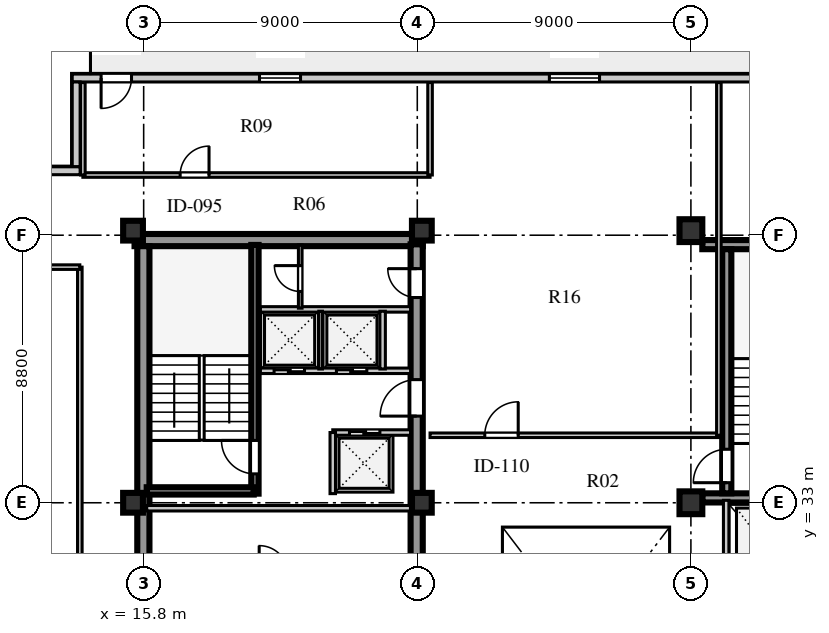
"""IFC4 building model, lengths in metres.
Left out: names, types, materials, properties, quantities, classifications, styles, units other than length and angle.
Written with IfcOpenShell. Run it as: python <this file> out.ifc"""

import sys

from ifc_helpers import new_model, si_unit, direction, frame, frame_2d, origin, origin_2d, place, context, subcontext, project, spatial, rectangle, extrude, element, fill, save


model = new_model("IFC4")
c1 = context("Model", 3, precision=1e-05, world=origin(), true_north=direction((0.0, 1.0)))
c2 = subcontext(c1, "Body", "Model", "MODEL_VIEW")
j1 = project(units=[si_unit("LENGTHUNIT", "METRE"), si_unit("PLANEANGLEUNIT", "RADIAN")], contexts=[c1])
p1 = place(None, origin())
s1 = spatial("IfcSite", under=j1, at=p1, CompositionType="ELEMENT")
p2 = place(p1, origin())
s2 = spatial("IfcBuilding", under=s1, at=p2, CompositionType="ELEMENT")
p3 = place(p2, frame((0.0, 0.0, 312.5)))
s3 = spatial("IfcBuildingStorey", under=s2, at=p3, CompositionType="ELEMENT", Elevation=312.5)
p4 = place(p3, frame((15.5, 41.64, 0.0), z_axis=(0.0, 0.0, 1.0), x_axis=(1.0, 0.0, 0.0)))
e1 = element("IfcWall", 1, at=p4, inside=s3, PredefinedType="SHEAR", context=c2, shape_type="SweptSolid", body=[
    extrude(rectangle(XDim=9.48, YDim=0.4, at=frame_2d((4.74, 0.0))), origin(), (0.0, 0.0, 1.0), 3.56),
])
p5 = place(p3, frame((15.79, 15.81, 0.0), z_axis=(0.0, 0.0, 1.0), x_axis=(0.0, 1.0, 0.0)))
e2 = element("IfcWall", 2, at=p5, inside=s3, PredefinedType="SHEAR", context=c2, shape_type="SweptSolid", body=[
    extrude(rectangle(XDim=25.63, YDim=0.4, at=frame_2d((12.815, 0.0))), origin(), (0.0, 0.0, 1.0), 3.56),
])
p6 = place(p3, frame((24.78, 15.74, 0.0), z_axis=(0.0, 0.0, 1.0), x_axis=(0.0, 1.0, 0.0)))
e3 = element("IfcWall", 3, at=p6, inside=s3, PredefinedType="SHEAR", context=c2, shape_type="SweptSolid", body=[
    extrude(rectangle(XDim=25.76, YDim=0.4, at=frame_2d((12.88, 0.0))), origin(), (0.0, 0.0, 1.0), 3.56),
])
p7 = place(p6, frame((1.61, 0.0, 0.0)))
e4 = element("IfcOpeningElement", 4, at=p7, cuts=e3, PredefinedType="OPENING", context=c2, shape_type="SweptSolid", body=[
    extrude(rectangle(XDim=1.2, YDim=2.1, at=frame_2d((0.6, 1.05))), frame((0.0, 0.21, 0.0), z_axis=(0.0, -1.0, 0.0), x_axis=(1.0, 0.0, 0.0)), (0.0, 0.0, 1.0), 0.42),
])
p8 = place(p6, frame((6.78, 0.0, 0.0)))
e5 = element("IfcOpeningElement", 5, at=p8, cuts=e3, PredefinedType="OPENING", context=c2, shape_type="SweptSolid", body=[
    extrude(rectangle(XDim=0.85, YDim=2.06, at=frame_2d((0.425, 1.03))), frame((0.0, 0.21, 0.0), z_axis=(0.0, -1.0, 0.0), x_axis=(1.0, 0.0, 0.0)), (0.0, 0.0, 1.0), 0.42),
])
p9 = place(p6, frame((12.11, 0.0, 0.0)))
e6 = element("IfcOpeningElement", 6, at=p9, cuts=e3, PredefinedType="OPENING", context=c2, shape_type="SweptSolid", body=[
    extrude(rectangle(XDim=1.5, YDim=2.12, at=frame_2d((0.75, 1.06))), frame((0.0, 0.21, 0.0), z_axis=(0.0, -1.0, 0.0), x_axis=(1.0, 0.0, 0.0)), (0.0, 0.0, 1.0), 0.42),
])
p10 = place(p6, frame((20.11, 0.0, 0.0)))
e7 = element("IfcOpeningElement", 7, at=p10, cuts=e3, PredefinedType="OPENING", context=c2, shape_type="SweptSolid", body=[
    extrude(rectangle(XDim=1.2, YDim=2.12, at=frame_2d((0.6, 1.06))), frame((0.0, 0.21, 0.0), z_axis=(0.0, -1.0, 0.0), x_axis=(1.0, 0.0, 0.0)), (0.0, 0.0, 1.0), 0.42),
])
p11 = place(p6, frame((24.01, 0.0, 0.0)))
e8 = element("IfcOpeningElement", 8, at=p11, cuts=e3, PredefinedType="OPENING", context=c2, shape_type="SweptSolid", body=[
    extrude(rectangle(XDim=0.95, YDim=2.1, at=frame_2d((0.475, 1.05))), frame((0.0, 0.21, 0.0), z_axis=(0.0, -1.0, 0.0), x_axis=(1.0, 0.0, 0.0)), (0.0, 0.0, 1.0), 0.42),
])
for number, where, z_axis, x_axis in (
    (9, (34.175, 33.16, 0.0), (0.0, 0.0, 1.0), (1.0, 0.0, 0.0)),
    (10, (34.175, 41.49, 0.0), (0.0, 0.0, 1.0), (1.0, 0.0, 0.0)),
):
    element("IfcWall", number, at=place(p3, frame(where, z_axis=z_axis, x_axis=x_axis)), inside=s3, PredefinedType="SHEAR", context=c2, shape_type="SweptSolid", body=[
        extrude(rectangle(XDim=4.695, YDim=0.3, at=frame_2d((2.348, 0.0))), origin(), (0.0, 0.0, 1.0), 3.56),
    ])
p12 = place(p3, frame((34.98, 33.31, 0.0), z_axis=(0.0, 0.0, 1.0), x_axis=(0.0, 1.0, 0.0)))
e11 = element("IfcWall", 11, at=p12, inside=s3, PredefinedType="SHEAR", context=c2, shape_type="SweptSolid", body=[
    extrude(rectangle(XDim=8.03, YDim=0.3, at=frame_2d((4.015, 0.0))), origin(), (0.0, 0.0, 1.0), 3.56),
])
p13 = place(p12, frame((0.35, 0.0, 0.0)))
e12 = element("IfcOpeningElement", 12, at=p13, cuts=e11, PredefinedType="OPENING", context=c2, shape_type="SweptSolid", body=[
    extrude(rectangle(XDim=1.1, YDim=2.1, at=frame_2d((0.55, 1.05))), frame((0.0, 0.16, 0.0), z_axis=(0.0, -1.0, 0.0), x_axis=(1.0, 0.0, 0.0)), (0.0, 0.0, 1.0), 0.32),
])
for number, where, z_axis, x_axis in (
    (13, (15.45, 33.0, 0.0), (0.0, 0.0, 1.0), (1.0, 0.0, 0.0)),
    (14, (15.45, 41.95, 0.0), (0.0, 0.0, 1.0), (1.0, 0.0, 0.0)),
    (15, (24.95, 33.0, 0.0), (0.0, 0.0, 1.0), (1.0, 0.0, 0.0)),
    (16, (24.95, 41.95, 0.0), (0.0, 0.0, 1.0), (1.0, 0.0, 0.0)),
):
    element("IfcColumn", number, at=place(p3, frame(where, z_axis=z_axis, x_axis=x_axis)), inside=s3, PredefinedType="COLUMN", context=c2, shape_type="SweptSolid", body=[
        extrude(rectangle(XDim=0.65, YDim=0.65, at=origin_2d()), origin(), (0.0, 0.0, 1.0), 3.56),
    ])
for number, where, z_axis, x_axis in (
    (17, (33.8, 33.0, 0.0), (0.0, 0.0, 1.0), (1.0, 0.0, 0.0)),
    (18, (33.8, 41.95, 0.0), (0.0, 0.0, 1.0), (1.0, 0.0, 0.0)),
):
    element("IfcColumn", number, at=place(p3, frame(where, z_axis=z_axis, x_axis=x_axis)), inside=s3, PredefinedType="COLUMN", context=c2, shape_type="SweptSolid", body=[
        extrude(rectangle(XDim=0.75, YDim=0.75, at=origin_2d()), origin(), (0.0, 0.0, 1.0), 3.56),
    ])
p14 = place(p3, frame((45.15, 46.97, 0.0), z_axis=(0.0, 0.0, 1.0), x_axis=(-1.0, 0.0, 0.0)))
e19 = element("IfcWall", 19, at=p14, inside=s3, PredefinedType="SOLIDWALL", context=c2, shape_type="SweptSolid", body=[
    extrude(rectangle(XDim=31.7, YDim=0.26, at=frame_2d((15.85, 0.0))), origin(), (0.0, 0.0, 1.0), 3.56),
])
p15 = place(p14, frame((29.75, 0.0, 0.0)))
e20 = element("IfcOpeningElement", 20, at=p15, cuts=e19, PredefinedType="OPENING", context=c2, shape_type="SweptSolid", body=[
    extrude(rectangle(XDim=1.0, YDim=2.05, at=frame_2d((0.5, 1.025))), frame((0.0, 0.14, 0.0), z_axis=(0.0, -1.0, 0.0), x_axis=(1.0, 0.0, 0.0)), (0.0, 0.0, 1.0), 0.28),
])
p16 = place(p14, frame((24.19, 0.0, 0.8)))
e21 = element("IfcOpeningElement", 21, at=p16, cuts=e19, PredefinedType="OPENING", context=c2, shape_type="SweptSolid", body=[
    extrude(rectangle(XDim=1.35, YDim=1.9, at=frame_2d((0.675, 0.95))), frame((0.0, 0.14, 0.0), z_axis=(0.0, -1.0, 0.0), x_axis=(1.0, 0.0, 0.0)), (0.0, 0.0, 1.0), 0.28),
])
p17 = place(p14, frame((14.355, 0.0, 0.8)))
e22 = element("IfcOpeningElement", 22, at=p17, cuts=e19, PredefinedType="OPENING", context=c2, shape_type="SweptSolid", body=[
    extrude(rectangle(XDim=1.65, YDim=1.95, at=frame_2d((0.825, 0.975))), frame((0.0, 0.14, 0.0), z_axis=(0.0, -1.0, 0.0), x_axis=(1.0, 0.0, 0.0)), (0.0, 0.0, 1.0), 0.28),
])
p18 = place(p14, frame((4.295, 0.0, 0.8)))
e23 = element("IfcOpeningElement", 23, at=p18, cuts=e19, PredefinedType="OPENING", context=c2, shape_type="SweptSolid", body=[
    extrude(rectangle(XDim=1.95, YDim=2.0, at=frame_2d((0.975, 1.0))), frame((0.0, 0.14, 0.0), z_axis=(0.0, -1.0, 0.0), x_axis=(1.0, 0.0, 0.0)), (0.0, 0.0, 1.0), 0.28),
])
p19 = place(p3, frame((13.58, 46.84, 0.0), z_axis=(0.0, 0.0, 1.0), x_axis=(0.0, -1.0, 0.0)))
e24 = element("IfcWall", 24, at=p19, inside=s3, PredefinedType="SOLIDWALL", context=c2, shape_type="SweptSolid", body=[
    extrude(rectangle(XDim=2.79, YDim=0.26, at=frame_2d((1.395, 0.0))), origin(), (0.0, 0.0, 1.0), 3.56),
])
p20 = place(p3, frame((13.71, 43.92, 0.0), z_axis=(0.0, 0.0, 1.0), x_axis=(-1.0, 0.0, 0.0)))
e25 = element("IfcWall", 25, at=p20, inside=s3, PredefinedType="SOLIDWALL", context=c2, shape_type="SweptSolid", body=[
    extrude(rectangle(XDim=3.31, YDim=0.26, at=frame_2d((1.655, 0.0))), origin(), (0.0, 0.0, 1.0), 3.56),
])
p21 = place(p3, frame((15.9, 32.82, 0.0), z_axis=(0.0, 0.0, 1.0), x_axis=(1.0, 0.0, 0.0)))
e26 = element("IfcWall", 26, at=p21, inside=s3, PredefinedType="SOLIDWALL", context=c2, shape_type="SweptSolid", body=[
    extrude(rectangle(XDim=8.68, YDim=0.18, at=frame_2d((4.34, 0.0))), origin(), (0.0, 0.0, 1.0), 2.96),
])
p22 = place(p3, frame((19.46, 33.3, 0.0), z_axis=(0.0, 0.0, 1.0), x_axis=(0.0, 1.0, 0.0)))
e27 = element("IfcWall", 27, at=p22, inside=s3, PredefinedType="SHEAR", context=c2, shape_type="SweptSolid", body=[
    extrude(rectangle(XDim=8.18, YDim=0.24, at=frame_2d((4.09, 0.0))), origin(), (0.0, 0.0, 1.0), 3.8),
])
p23 = place(p22, frame((0.65, 0.0, 0.0)))
e28 = element("IfcOpeningElement", 28, at=p23, cuts=e27, PredefinedType="OPENING", context=c2, shape_type="SweptSolid", body=[
    extrude(rectangle(XDim=1.1, YDim=2.1, at=frame_2d((0.55, 1.05))), frame((0.0, 0.13, 0.0), z_axis=(0.0, -1.0, 0.0), x_axis=(1.0, 0.0, 0.0)), (0.0, 0.0, 1.0), 0.26),
])
p24 = place(p3, frame((15.9, 33.39, 0.0), z_axis=(0.0, 0.0, 1.0), x_axis=(1.0, 0.0, 0.0)))
e29 = element("IfcWall", 29, at=p24, inside=s3, PredefinedType="SHEAR", context=c2, shape_type="SweptSolid", body=[
    extrude(rectangle(XDim=3.52, YDim=0.24, at=frame_2d((1.76, 0.0))), origin(), (0.0, 0.0, 1.0), 3.8),
])
p25 = place(p3, frame((22.02, 35.31, 0.0), z_axis=(0.0, 0.0, 1.0), x_axis=(1.0, 0.0, 0.0)))
e30 = element("IfcWall", 30, at=p25, inside=s3, PredefinedType="SOLIDWALL", context=c2, shape_type="SweptSolid", body=[
    extrude(rectangle(XDim=2.56, YDim=0.18, at=frame_2d((1.28, 0.0))), origin(), (0.0, 0.0, 1.0), 3.56),
])
p26 = place(p25, frame((0.55, 0.0, 0.0)))
e31 = element("IfcOpeningElement", 31, at=p26, cuts=e30, PredefinedType="OPENING", context=c2, shape_type="SweptSolid", body=[
    extrude(rectangle(XDim=1.0, YDim=2.1, at=frame_2d((0.5, 1.05))), frame((0.0, 0.1, 0.0), z_axis=(0.0, -1.0, 0.0), x_axis=(1.0, 0.0, 0.0)), (0.0, 0.0, 1.0), 0.2),
])
p27 = place(p3, frame((22.02, 33.3, 0.0), z_axis=(0.0, 0.0, 1.0), x_axis=(0.0, 1.0, 0.0)))
e32 = element("IfcWall", 32, at=p27, inside=s3, PredefinedType="SOLIDWALL", context=c2, shape_type="SweptSolid", body=[
    extrude(rectangle(XDim=2.01, YDim=0.18, at=frame_2d((1.005, 0.0))), origin(), (0.0, 0.0, 1.0), 3.56),
])
p28 = place(p3, frame((19.64, 37.34, 0.0), z_axis=(0.0, 0.0, 1.0), x_axis=(1.0, 0.0, 0.0)))
e33 = element("IfcWall", 33, at=p28, inside=s3, PredefinedType="SOLIDWALL", context=c2, shape_type="SweptSolid", body=[
    extrude(rectangle(XDim=4.94, YDim=0.18, at=frame_2d((2.47, 0.0))), origin(), (0.0, 0.0, 1.0), 3.56),
])
p29 = place(p28, frame((0.45, 0.0, 0.0)))
e34 = element("IfcOpeningElement", 34, at=p29, cuts=e33, PredefinedType="OPENING", context=c2, shape_type="SweptSolid", body=[
    extrude(rectangle(XDim=1.0, YDim=2.1, at=frame_2d((0.5, 1.05))), frame((0.0, 0.1, 0.0), z_axis=(0.0, -1.0, 0.0), x_axis=(1.0, 0.0, 0.0)), (0.0, 0.0, 1.0), 0.2),
])
p30 = place(p28, frame((2.5, 0.0, 0.0)))
e35 = element("IfcOpeningElement", 35, at=p30, cuts=e33, PredefinedType="OPENING", context=c2, shape_type="SweptSolid", body=[
    extrude(rectangle(XDim=1.0, YDim=2.1, at=frame_2d((0.5, 1.05))), frame((0.0, 0.1, 0.0), z_axis=(0.0, -1.0, 0.0), x_axis=(1.0, 0.0, 0.0)), (0.0, 0.0, 1.0), 0.2),
])
p31 = place(p3, frame((19.64, 39.36, 0.0), z_axis=(0.0, 0.0, 1.0), x_axis=(1.0, 0.0, 0.0)))
e36 = element("IfcWall", 36, at=p31, inside=s3, PredefinedType="SOLIDWALL", context=c2, shape_type="SweptSolid", body=[
    extrude(rectangle(XDim=4.94, YDim=0.18, at=frame_2d((2.47, 0.0))), origin(), (0.0, 0.0, 1.0), 3.56),
])
p32 = place(p3, frame((21.62, 37.4, 0.0), z_axis=(0.0, 0.0, 1.0), x_axis=(0.0, 1.0, 0.0)))
e37 = element("IfcWall", 37, at=p32, inside=s3, PredefinedType="PARTITIONING", context=c2, shape_type="SweptSolid", body=[
    extrude(rectangle(XDim=1.9, YDim=0.12, at=frame_2d((0.95, 0.0))), origin(), (0.0, 0.0, 1.0), 3.56),
])
p33 = place(p3, frame((23.66, 37.4, 0.0), z_axis=(0.0, 0.0, 1.0), x_axis=(0.0, 1.0, 0.0)))
e38 = element("IfcWall", 38, at=p33, inside=s3, PredefinedType="SOLIDWALL", context=c2, shape_type="SweptSolid", body=[
    extrude(rectangle(XDim=1.9, YDim=0.18, at=frame_2d((0.95, 0.0))), origin(), (0.0, 0.0, 1.0), 3.56),
])
p34 = place(p3, frame((20.95, 39.4, 0.0), z_axis=(0.0, 0.0, 1.0), x_axis=(0.0, 1.0, 0.0)))
e39 = element("IfcWall", 39, at=p34, inside=s3, PredefinedType="PARTITIONING", context=c2, shape_type="SweptSolid", body=[
    extrude(rectangle(XDim=2.08, YDim=0.12, at=frame_2d((1.04, 0.0))), origin(), (0.0, 0.0, 1.0), 3.56),
])
p35 = place(p34, frame((0.55, 0.0, 0.0)))
e40 = element("IfcOpeningElement", 40, at=p35, cuts=e39, PredefinedType="OPENING", context=c2, shape_type="SweptSolid", body=[
    extrude(rectangle(XDim=0.85, YDim=2.06, at=frame_2d((0.425, 1.03))), frame((0.0, 0.07, 0.0), z_axis=(0.0, -1.0, 0.0), x_axis=(1.0, 0.0, 0.0)), (0.0, 0.0, 1.0), 0.14),
])
p36 = place(p3, frame((34.96, 28.86, 0.0), z_axis=(0.0, 0.0, 1.0), x_axis=(0.0, 1.0, 0.0)))
e41 = element("IfcWall", 41, at=p36, inside=s3, PredefinedType="SOLIDWALL", context=c2, shape_type="SweptSolid", body=[
    extrude(rectangle(XDim=4.22, YDim=0.18, at=frame_2d((2.11, 0.0))), origin(), (0.0, 0.0, 1.0), 3.56),
])
p37 = place(p3, frame((25.22, 35.22, 0.0), z_axis=(0.0, 0.0, 1.0), x_axis=(1.0, 0.0, 0.0)))
e42 = element("IfcWall", 42, at=p37, inside=s3, PredefinedType="PARTITIONING", context=c2, shape_type="SweptSolid", body=[
    extrude(rectangle(XDim=9.5, YDim=0.15, at=frame_2d((4.75, 0.0))), origin(), (0.0, 0.0, 1.0), 3.56),
])
p38 = place(p37, frame((1.8, 0.0, 0.0)))
e43 = element("IfcOpeningElement", 43, at=p38, cuts=e42, PredefinedType="OPENING", context=c2, shape_type="SweptSolid", body=[
    extrude(rectangle(XDim=1.1, YDim=2.08, at=frame_2d((0.55, 1.04))), frame((0.0, 0.085, 0.0), z_axis=(0.0, -1.0, 0.0), x_axis=(1.0, 0.0, 0.0)), (0.0, 0.0, 1.0), 0.17),
])
p39 = place(p3, frame((13.8, 43.78, 0.0), z_axis=(0.0, 0.0, 1.0), x_axis=(1.0, 0.0, 0.0)))
e44 = element("IfcWall", 44, at=p39, inside=s3, PredefinedType="PARTITIONING", context=c2, shape_type="SweptSolid", body=[
    extrude(rectangle(XDim=11.42, YDim=0.15, at=frame_2d((5.71, 0.0))), origin(), (0.0, 0.0, 1.0), 3.56),
])
p40 = place(p39, frame((3.2, 0.0, 0.0)))
e45 = element("IfcOpeningElement", 45, at=p40, cuts=e44, PredefinedType="OPENING", context=c2, shape_type="SweptSolid", body=[
    extrude(rectangle(XDim=0.95, YDim=2.08, at=frame_2d((0.475, 1.04))), frame((0.0, 0.085, 0.0), z_axis=(0.0, -1.0, 0.0), x_axis=(1.0, 0.0, 0.0)), (0.0, 0.0, 1.0), 0.17),
])
p41 = place(p3, frame((13.8, 43.78, 0.0), z_axis=(0.0, 0.0, 1.0), x_axis=(0.0, 1.0, 0.0)))
e46 = element("IfcWall", 46, at=p41, inside=s3, PredefinedType="PARTITIONING", context=c2, shape_type="SweptSolid", body=[
    extrude(rectangle(XDim=3.04, YDim=0.15, at=frame_2d((1.52, 0.0))), origin(), (0.0, 0.0, 1.0), 3.56),
])
p42 = place(p3, frame((25.22, 43.78, 0.0), z_axis=(0.0, 0.0, 1.0), x_axis=(0.0, 1.0, 0.0)))
e47 = element("IfcWall", 47, at=p42, inside=s3, PredefinedType="PARTITIONING", context=c2, shape_type="SweptSolid", body=[
    extrude(rectangle(XDim=3.04, YDim=0.15, at=frame_2d((1.52, 0.0))), origin(), (0.0, 0.0, 1.0), 3.11),
])
p43 = place(p3, frame((13.7, 16.45, 0.0), z_axis=(0.0, 0.0, 1.0), x_axis=(0.0, 1.0, 0.0)))
e48 = element("IfcWall", 48, at=p43, inside=s3, PredefinedType="PARTITIONING", context=c2, shape_type="SweptSolid", body=[
    extrude(rectangle(XDim=24.3, YDim=0.15, at=frame_2d((12.15, 0.0))), origin(), (0.0, 0.0, 1.0), 3.56),
])
p44 = place(p43, frame((5.1, 0.0, 0.0)))
e49 = element("IfcOpeningElement", 49, at=p44, cuts=e48, PredefinedType="OPENING", context=c2, shape_type="SweptSolid", body=[
    extrude(rectangle(XDim=0.95, YDim=2.08, at=frame_2d((0.475, 1.04))), frame((0.0, 0.085, 0.0), z_axis=(0.0, -1.0, 0.0), x_axis=(1.0, 0.0, 0.0)), (0.0, 0.0, 1.0), 0.17),
])
p45 = place(p3, frame((10.68, 40.75, 0.0), z_axis=(0.0, 0.0, 1.0), x_axis=(1.0, 0.0, 0.0)))
e50 = element("IfcWall", 50, at=p45, inside=s3, PredefinedType="PARTITIONING", context=c2, shape_type="SweptSolid", body=[
    extrude(rectangle(XDim=3.02, YDim=0.15, at=frame_2d((1.51, 0.0))), origin(), (0.0, 0.0, 1.0), 3.56),
])
p46 = place(p3, frame((34.72, 35.22, 0.0), z_axis=(0.0, 0.0, 1.0), x_axis=(0.0, 1.0, 0.0)))
e51 = element("IfcWall", 51, at=p46, inside=s3, PredefinedType="PARTITIONING", context=c2, shape_type="SweptSolid", body=[
    extrude(rectangle(XDim=11.6, YDim=0.15, at=frame_2d((5.8, 0.0))), origin(), (0.0, 0.0, 1.0), 3.56),
])
p47 = place(p15, frame((1.0, 0.0, 0.0), z_axis=(0.0, 0.0, 1.0), x_axis=(-1.0, 0.0, 0.0)))
e52 = element("IfcDoor", 52, at=p47, inside=s3, OperationType="SINGLE_SWING_LEFT", PredefinedType="DOOR", context=c2, shape_type="SweptSolid", body=[
    extrude(rectangle(XDim=1.0, YDim=2.05, at=frame_2d((0.5, 1.025))), frame((0.0, 0.025, 0.0), z_axis=(0.0, -1.0, 0.0), x_axis=(1.0, 0.0, 0.0)), (0.0, 0.0, 1.0), 0.05),
])
fill(e20, e52)
p48 = place(p16, origin())
e53 = element("IfcWindow", 53, at=p48, inside=s3, PartitioningType="SINGLE_PANEL", PredefinedType="WINDOW", context=c2, shape_type="SweptSolid", body=[
    extrude(rectangle(XDim=1.35, YDim=1.9, at=frame_2d((0.675, 0.95))), frame((0.0, 0.03, 0.0), z_axis=(0.0, -1.0, 0.0), x_axis=(1.0, 0.0, 0.0)), (0.0, 0.0, 1.0), 0.06),
])
fill(e21, e53)
p49 = place(p17, origin())
e54 = element("IfcWindow", 54, at=p49, inside=s3, PartitioningType="SINGLE_PANEL", PredefinedType="WINDOW", context=c2, shape_type="SweptSolid", body=[
    extrude(rectangle(XDim=1.65, YDim=1.95, at=frame_2d((0.825, 0.975))), frame((0.0, 0.03, 0.0), z_axis=(0.0, -1.0, 0.0), x_axis=(1.0, 0.0, 0.0)), (0.0, 0.0, 1.0), 0.06),
])
fill(e22, e54)
p50 = place(p23, origin())
e55 = element("IfcDoor", 55, at=p50, inside=s3, OperationType="SINGLE_SWING_RIGHT", PredefinedType="DOOR", context=c2, shape_type="SweptSolid", body=[
    extrude(rectangle(XDim=1.1, YDim=2.1, at=frame_2d((0.55, 1.05))), frame((0.0, 0.025, 0.0), z_axis=(0.0, -1.0, 0.0), x_axis=(1.0, 0.0, 0.0)), (0.0, 0.0, 1.0), 0.05),
])
fill(e28, e55)
p51 = place(p10, frame((1.2, 0.0, 0.0), z_axis=(0.0, 0.0, 1.0), x_axis=(-1.0, 0.0, 0.0)))
e56 = element("IfcDoor", 56, at=p51, inside=s3, OperationType="SINGLE_SWING_RIGHT", PredefinedType="DOOR", context=c2, shape_type="SweptSolid", body=[
    extrude(rectangle(XDim=1.2, YDim=2.12, at=frame_2d((0.6, 1.06))), frame((0.0, 0.025, 0.0), z_axis=(0.0, -1.0, 0.0), x_axis=(1.0, 0.0, 0.0)), (0.0, 0.0, 1.0), 0.05),
])
fill(e7, e56)
p52 = place(p29, frame((1.0, 0.0, 0.0), z_axis=(0.0, 0.0, 1.0), x_axis=(-1.0, 0.0, 0.0)))
e57 = element("IfcDoor", 57, at=p52, inside=s3, OperationType="DOUBLE_DOOR_SLIDING", PredefinedType="DOOR", context=c2, shape_type="SweptSolid", body=[
    extrude(rectangle(XDim=1.0, YDim=2.1, at=frame_2d((0.5, 1.05))), frame((0.0, 0.025, 0.0), z_axis=(0.0, -1.0, 0.0), x_axis=(1.0, 0.0, 0.0)), (0.0, 0.0, 1.0), 0.05),
])
fill(e34, e57)
p53 = place(p30, frame((1.0, 0.0, 0.0), z_axis=(0.0, 0.0, 1.0), x_axis=(-1.0, 0.0, 0.0)))
e58 = element("IfcDoor", 58, at=p53, inside=s3, OperationType="DOUBLE_DOOR_SLIDING", PredefinedType="DOOR", context=c2, shape_type="SweptSolid", body=[
    extrude(rectangle(XDim=1.0, YDim=2.1, at=frame_2d((0.5, 1.05))), frame((0.0, 0.025, 0.0), z_axis=(0.0, -1.0, 0.0), x_axis=(1.0, 0.0, 0.0)), (0.0, 0.0, 1.0), 0.05),
])
fill(e35, e58)
p54 = place(p26, origin())
e59 = element("IfcDoor", 59, at=p54, inside=s3, OperationType="DOUBLE_DOOR_SLIDING", PredefinedType="DOOR", context=c2, shape_type="SweptSolid", body=[
    extrude(rectangle(XDim=1.0, YDim=2.1, at=frame_2d((0.5, 1.05))), frame((0.0, 0.025, 0.0), z_axis=(0.0, -1.0, 0.0), x_axis=(1.0, 0.0, 0.0)), (0.0, 0.0, 1.0), 0.05),
])
fill(e31, e59)
p55 = place(p35, origin())
e60 = element("IfcDoor", 60, at=p55, inside=s3, OperationType="SINGLE_SWING_RIGHT", PredefinedType="DOOR", context=c2, shape_type="SweptSolid", body=[
    extrude(rectangle(XDim=0.85, YDim=2.06, at=frame_2d((0.425, 1.03))), frame((0.0, 0.025, 0.0), z_axis=(0.0, -1.0, 0.0), x_axis=(1.0, 0.0, 0.0)), (0.0, 0.0, 1.0), 0.05),
])
fill(e40, e60)
p56 = place(p11, frame((0.95, 0.0, 0.0), z_axis=(0.0, 0.0, 1.0), x_axis=(-1.0, 0.0, 0.0)))
e61 = element("IfcDoor", 61, at=p56, inside=s3, OperationType="SINGLE_SWING_LEFT", PredefinedType="DOOR", context=c2, shape_type="SweptSolid", body=[
    extrude(rectangle(XDim=0.95, YDim=2.1, at=frame_2d((0.475, 1.05))), frame((0.0, 0.025, 0.0), z_axis=(0.0, -1.0, 0.0), x_axis=(1.0, 0.0, 0.0)), (0.0, 0.0, 1.0), 0.05),
])
fill(e8, e61)
p57 = place(p13, origin())
e62 = element("IfcDoor", 62, at=p57, inside=s3, OperationType="SINGLE_SWING_LEFT", PredefinedType="DOOR", context=c2, shape_type="SweptSolid", body=[
    extrude(rectangle(XDim=1.1, YDim=2.1, at=frame_2d((0.55, 1.05))), frame((0.0, 0.025, 0.0), z_axis=(0.0, -1.0, 0.0), x_axis=(1.0, 0.0, 0.0)), (0.0, 0.0, 1.0), 0.05),
])
fill(e12, e62)
p58 = place(p40, origin())
e63 = element("IfcDoor", 63, at=p58, inside=s3, OperationType="SINGLE_SWING_RIGHT", PredefinedType="DOOR", context=c2, shape_type="SweptSolid", body=[
    extrude(rectangle(XDim=0.95, YDim=2.08, at=frame_2d((0.475, 1.04))), frame((0.0, 0.025, 0.0), z_axis=(0.0, -1.0, 0.0), x_axis=(1.0, 0.0, 0.0)), (0.0, 0.0, 1.0), 0.05),
])
fill(e45, e63)
p59 = place(p38, origin())
e64 = element("IfcDoor", 64, at=p59, inside=s3, OperationType="SINGLE_SWING_RIGHT", PredefinedType="DOOR", context=c2, shape_type="SweptSolid", body=[
    extrude(rectangle(XDim=1.1, YDim=2.08, at=frame_2d((0.55, 1.04))), frame((0.0, 0.025, 0.0), z_axis=(0.0, -1.0, 0.0), x_axis=(1.0, 0.0, 0.0)), (0.0, 0.0, 1.0), 0.05),
])
fill(e43, e64)
save(model, sys.argv[1])
